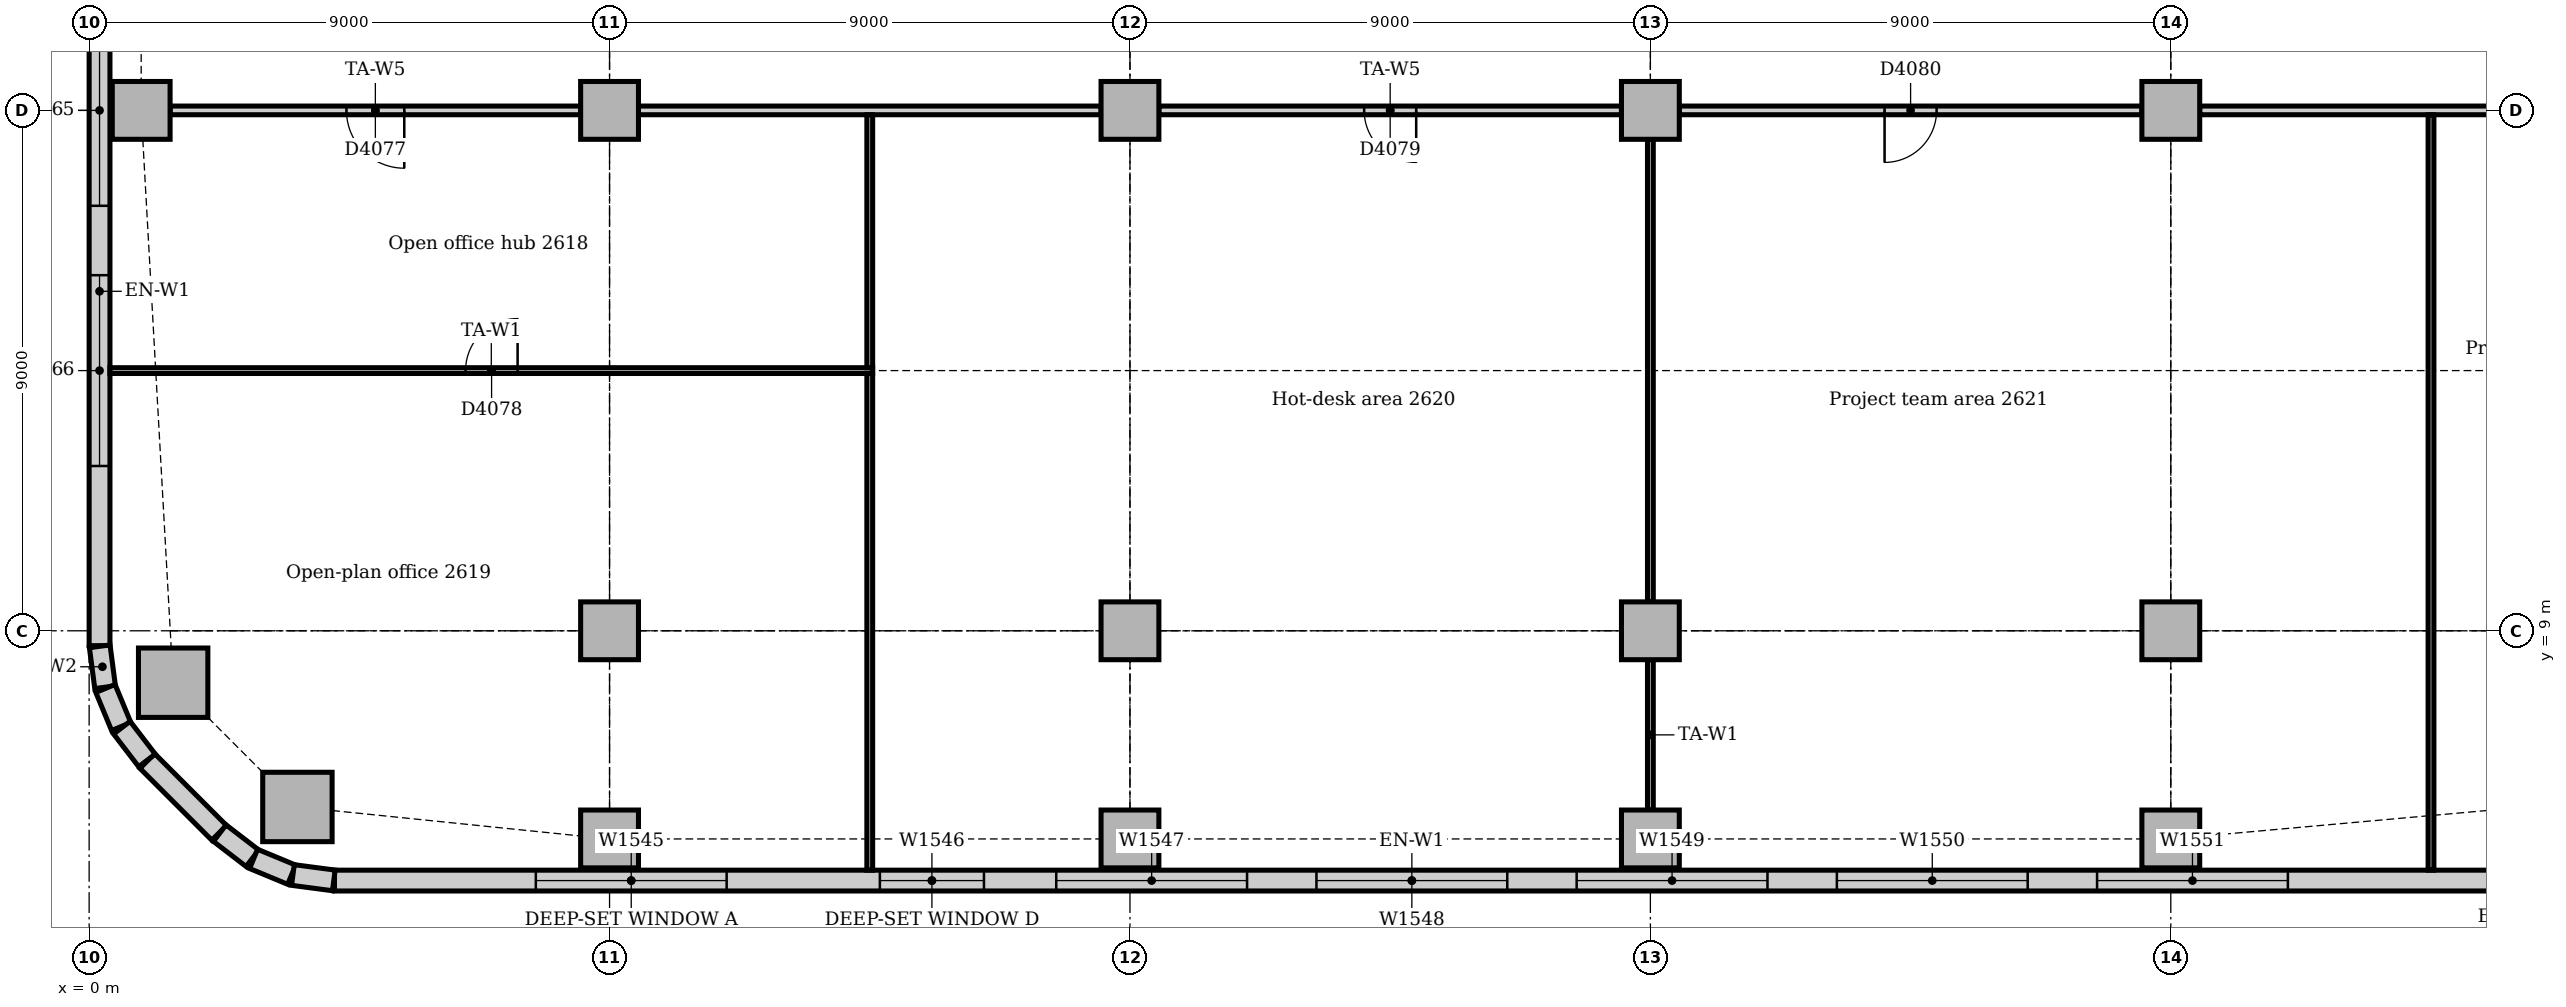
"""IFC4 building model, lengths in metres.
Left out: names, types, materials, properties, quantities, classifications, styles, units other than length and angle.
Written with IfcOpenShell. Run it as: python <this file> out.ifc"""

import sys

from ifc_helpers import new_model, si_unit, direction, frame, frame_2d, origin, origin_2d, place, context, subcontext, project, spatial, rectangle, extrude, element, fill, save


model = new_model("IFC4")
c1 = context("Model", 3, precision=1e-05, world=origin(), true_north=direction((0.0, 1.0)))
c2 = subcontext(c1, "Body", "Model", "MODEL_VIEW")
j1 = project(units=[si_unit("LENGTHUNIT", "METRE"), si_unit("PLANEANGLEUNIT", "RADIAN")], contexts=[c1])
p1 = place(None, origin())
s1 = spatial("IfcSite", under=j1, at=p1, CompositionType="ELEMENT")
p2 = place(p1, origin())
s2 = spatial("IfcBuilding", under=s1, at=p2, CompositionType="ELEMENT")
p3 = place(p2, frame((0.0, 0.0, 112.0)))
s3 = spatial("IfcBuildingStorey", under=s2, at=p3, CompositionType="ELEMENT", Elevation=112.0)
for number, where, z_axis, x_axis in (
    (1, (3.602, 5.953, 0.0), (0.0, 0.0, 1.0), (1.0, 0.0, 0.0)),
    (2, (1.453, 8.102, 0.0), (0.0, 0.0, 1.0), (1.0, 0.0, 0.0)),
):
    element("IfcColumn", number, at=place(p3, frame(where, z_axis=z_axis, x_axis=x_axis)), inside=s3, PredefinedType="COLUMN", context=c2, shape_type="SweptSolid", body=[
        extrude(rectangle(XDim=1.2, YDim=1.2, at=origin_2d()), origin(), (0.0, 0.0, 1.0), 3.85),
    ])
for number, where, z_axis, x_axis in (
    (3, (9.0, 5.4, 0.0), (0.0, 0.0, 1.0), (1.0, 0.0, 0.0)),
    (4, (18.0, 5.4, 0.0), (0.0, 0.0, 1.0), (1.0, 0.0, 0.0)),
    (5, (27.0, 5.4, 0.0), (0.0, 0.0, 1.0), (1.0, 0.0, 0.0)),
    (6, (36.0, 5.4, 0.0), (0.0, 0.0, 1.0), (1.0, 0.0, 0.0)),
    (7, (0.9, 18.0, 0.0), (0.0, 0.0, 1.0), (1.0, 0.0, 0.0)),
    (8, (9.0, 9.0, 0.0), (0.0, 0.0, 1.0), (1.0, 0.0, 0.0)),
    (9, (9.0, 18.0, 0.0), (0.0, 0.0, 1.0), (1.0, 0.0, 0.0)),
    (10, (18.0, 9.0, 0.0), (0.0, 0.0, 1.0), (1.0, 0.0, 0.0)),
    (11, (18.0, 18.0, 0.0), (0.0, 0.0, 1.0), (1.0, 0.0, 0.0)),
    (12, (27.0, 9.0, 0.0), (0.0, 0.0, 1.0), (1.0, 0.0, 0.0)),
    (13, (27.0, 18.0, 0.0), (0.0, 0.0, 1.0), (1.0, 0.0, 0.0)),
    (14, (36.0, 9.0, 0.0), (0.0, 0.0, 1.0), (1.0, 0.0, 0.0)),
    (15, (36.0, 18.0, 0.0), (0.0, 0.0, 1.0), (1.0, 0.0, 0.0)),
):
    element("IfcColumn", number, at=place(p3, frame(where, z_axis=z_axis, x_axis=x_axis)), inside=s3, PredefinedType="COLUMN", context=c2, shape_type="SweptSolid", body=[
        extrude(rectangle(XDim=1.0, YDim=1.0, at=origin_2d()), origin(), (0.0, 0.0, 1.0), 3.85),
    ])
p4 = place(p3, frame((4.243, 4.68, 0.0), z_axis=(0.0, 0.0, 1.0), x_axis=(1.0, 0.0, 0.0)))
e16 = element("IfcWall", 16, at=p4, inside=s3, PredefinedType="STANDARD", context=c2, shape_type="SweptSolid", body=[
    extrude(rectangle(XDim=37.265, YDim=0.36, at=frame_2d((18.632, 0.0))), origin(), (0.0, 0.0, 1.0), 3.85),
])
p5 = place(p4, frame((3.482, 0.0, 0.9)))
e17 = element("IfcOpeningElement", 17, at=p5, cuts=e16, PredefinedType="OPENING", context=c2, shape_type="SweptSolid", body=[
    extrude(rectangle(XDim=3.3, YDim=1.6, at=frame_2d((1.65, 0.8))), frame((0.0, 0.19, 0.0), z_axis=(0.0, -1.0, 0.0), x_axis=(1.0, 0.0, 0.0)), (0.0, 0.0, 1.0), 0.38),
])
p6 = place(p4, frame((9.432, 0.0, 0.9)))
e18 = element("IfcOpeningElement", 18, at=p6, cuts=e16, PredefinedType="OPENING", context=c2, shape_type="SweptSolid", body=[
    extrude(rectangle(XDim=1.8, YDim=1.6, at=frame_2d((0.9, 0.8))), frame((0.0, 0.19, 0.0), z_axis=(0.0, -1.0, 0.0), x_axis=(1.0, 0.0, 0.0)), (0.0, 0.0, 1.0), 0.38),
])
p7 = place(p4, frame((12.482, 0.0, 0.9)))
e19 = element("IfcOpeningElement", 19, at=p7, cuts=e16, PredefinedType="OPENING", context=c2, shape_type="SweptSolid", body=[
    extrude(rectangle(XDim=3.3, YDim=1.6, at=frame_2d((1.65, 0.8))), frame((0.0, 0.19, 0.0), z_axis=(0.0, -1.0, 0.0), x_axis=(1.0, 0.0, 0.0)), (0.0, 0.0, 1.0), 0.38),
])
p8 = place(p4, frame((16.982, 0.0, 0.9)))
e20 = element("IfcOpeningElement", 20, at=p8, cuts=e16, PredefinedType="OPENING", context=c2, shape_type="SweptSolid", body=[
    extrude(rectangle(XDim=3.3, YDim=1.6, at=frame_2d((1.65, 0.8))), frame((0.0, 0.19, 0.0), z_axis=(0.0, -1.0, 0.0), x_axis=(1.0, 0.0, 0.0)), (0.0, 0.0, 1.0), 0.38),
])
p9 = place(p4, frame((21.482, 0.0, 0.9)))
e21 = element("IfcOpeningElement", 21, at=p9, cuts=e16, PredefinedType="OPENING", context=c2, shape_type="SweptSolid", body=[
    extrude(rectangle(XDim=3.3, YDim=1.6, at=frame_2d((1.65, 0.8))), frame((0.0, 0.19, 0.0), z_axis=(0.0, -1.0, 0.0), x_axis=(1.0, 0.0, 0.0)), (0.0, 0.0, 1.0), 0.38),
])
p10 = place(p4, frame((25.982, 0.0, 0.9)))
e22 = element("IfcOpeningElement", 22, at=p10, cuts=e16, PredefinedType="OPENING", context=c2, shape_type="SweptSolid", body=[
    extrude(rectangle(XDim=3.3, YDim=1.6, at=frame_2d((1.65, 0.8))), frame((0.0, 0.19, 0.0), z_axis=(0.0, -1.0, 0.0), x_axis=(1.0, 0.0, 0.0)), (0.0, 0.0, 1.0), 0.38),
])
p11 = place(p4, frame((30.482, 0.0, 0.9)))
e23 = element("IfcOpeningElement", 23, at=p11, cuts=e16, PredefinedType="OPENING", context=c2, shape_type="SweptSolid", body=[
    extrude(rectangle(XDim=3.3, YDim=1.6, at=frame_2d((1.65, 0.8))), frame((0.0, 0.19, 0.0), z_axis=(0.0, -1.0, 0.0), x_axis=(1.0, 0.0, 0.0)), (0.0, 0.0, 1.0), 0.38),
])
p12 = place(p3, frame((0.18, 21.0, 0.0), z_axis=(0.0, 0.0, 1.0), x_axis=(0.0, -1.0, 0.0)))
e24 = element("IfcWall", 24, at=p12, inside=s3, PredefinedType="STANDARD", context=c2, shape_type="SweptSolid", body=[
    extrude(rectangle(XDim=12.257, YDim=0.36, at=frame_2d((6.129, 0.0))), origin(), (0.0, 0.0, 1.0), 3.85),
])
p13 = place(p12, frame((1.35, 0.0, 0.9)))
e25 = element("IfcOpeningElement", 25, at=p13, cuts=e24, PredefinedType="OPENING", context=c2, shape_type="SweptSolid", body=[
    extrude(rectangle(XDim=3.3, YDim=1.6, at=frame_2d((1.65, 0.8))), frame((0.0, 0.19, 0.0), z_axis=(0.0, -1.0, 0.0), x_axis=(1.0, 0.0, 0.0)), (0.0, 0.0, 1.0), 0.38),
])
p14 = place(p12, frame((5.85, 0.0, 0.9)))
e26 = element("IfcOpeningElement", 26, at=p14, cuts=e24, PredefinedType="OPENING", context=c2, shape_type="SweptSolid", body=[
    extrude(rectangle(XDim=3.3, YDim=1.6, at=frame_2d((1.65, 0.8))), frame((0.0, 0.19, 0.0), z_axis=(0.0, -1.0, 0.0), x_axis=(1.0, 0.0, 0.0)), (0.0, 0.0, 1.0), 0.38),
])
p15 = place(p3, frame((1.006, 6.749, 0.0), z_axis=(0.0, 0.0, 1.0), x_axis=(0.707106781187, -0.707106781187, 0.0)))
e27 = element("IfcWall", 27, at=p15, inside=s3, PredefinedType="STANDARD", context=c2, shape_type="SweptSolid", body=[
    extrude(rectangle(XDim=1.757, YDim=0.36, at=frame_2d((0.879, 0.0))), origin(), (0.0, 0.0, 1.0), 3.85),
])
for number, where, z_axis, x_axis in (
    (28, (0.183, 8.731, 0.0), (0.0, 0.0, 1.0), (0.131, -0.991, 0.0)),
    (29, (0.282, 8.003, 0.0), (0.0, 0.0, 1.0), (0.383, -0.924, 0.0)),
):
    element("IfcWall", number, at=place(p3, frame(where, z_axis=z_axis, x_axis=x_axis)), inside=s3, PredefinedType="STANDARD", context=c2, shape_type="SweptSolid", body=[
        extrude(rectangle(XDim=0.713, YDim=0.36, at=frame_2d((0.356, 0.0))), origin(), (0.0, 0.0, 1.0), 3.85),
    ])
for number, where, z_axis, x_axis in (
    (30, (0.566, 7.324, 0.0), (0.0, 0.0, 1.0), (0.609, -0.793, 0.0)),
    (31, (2.259, 5.5, 0.0), (0.0, 0.0, 1.0), (0.793, -0.609, 0.0)),
):
    element("IfcWall", number, at=place(p3, frame(where, z_axis=z_axis, x_axis=x_axis)), inside=s3, PredefinedType="STANDARD", context=c2, shape_type="SweptSolid", body=[
        extrude(rectangle(XDim=0.713, YDim=0.36, at=frame_2d((0.357, 0.0))), origin(), (0.0, 0.0, 1.0), 3.85),
    ])
for number, where, z_axis, x_axis in (
    (32, (2.844, 5.055, 0.0), (0.0, 0.0, 1.0), (0.924, -0.383, 0.0)),
    (33, (3.524, 4.776, 0.0), (0.0, 0.0, 1.0), (0.991, -0.131, 0.0)),
):
    element("IfcWall", number, at=place(p3, frame(where, z_axis=z_axis, x_axis=x_axis)), inside=s3, PredefinedType="STANDARD", context=c2, shape_type="SweptSolid", body=[
        extrude(rectangle(XDim=0.713, YDim=0.36, at=frame_2d((0.356, 0.0))), origin(), (0.0, 0.0, 1.0), 3.85),
    ])
p16 = place(p3, frame((36.5, 18.0, 0.0), z_axis=(0.0, 0.0, 1.0), x_axis=(1.0, 0.0, 0.0)))
e34 = element("IfcWall", 34, at=p16, inside=s3, PredefinedType="PARTITIONING", context=c2, shape_type="SweptSolid", body=[
    extrude(rectangle(XDim=8.0, YDim=0.15, at=frame_2d((4.0, 0.0))), origin(), (0.0, 0.0, 1.0), 3.158),
])
p17 = place(p3, frame((27.5, 18.0, 0.0), z_axis=(0.0, 0.0, 1.0), x_axis=(1.0, 0.0, 0.0)))
e35 = element("IfcWall", 35, at=p17, inside=s3, PredefinedType="PARTITIONING", context=c2, shape_type="SweptSolid", body=[
    extrude(rectangle(XDim=8.0, YDim=0.15, at=frame_2d((4.0, 0.0))), origin(), (0.0, 0.0, 1.0), 3.158),
])
p18 = place(p17, frame((3.55, 0.0, 0.0)))
e36 = element("IfcOpeningElement", 36, at=p18, cuts=e35, PredefinedType="OPENING", context=c2, shape_type="SweptSolid", body=[
    extrude(rectangle(XDim=0.9, YDim=2.1, at=frame_2d((0.45, 1.05))), frame((0.0, 0.085, 0.0), z_axis=(0.0, -1.0, 0.0), x_axis=(1.0, 0.0, 0.0)), (0.0, 0.0, 1.0), 0.17),
])
p19 = place(p3, frame((18.5, 18.0, 0.0), z_axis=(0.0, 0.0, 1.0), x_axis=(1.0, 0.0, 0.0)))
e37 = element("IfcWall", 37, at=p19, inside=s3, PredefinedType="PARTITIONING", context=c2, shape_type="SweptSolid", body=[
    extrude(rectangle(XDim=8.0, YDim=0.15, at=frame_2d((4.0, 0.0))), origin(), (0.0, 0.0, 1.0), 3.158),
])
p20 = place(p19, frame((3.55, 0.0, 0.0)))
e38 = element("IfcOpeningElement", 38, at=p20, cuts=e37, PredefinedType="OPENING", context=c2, shape_type="SweptSolid", body=[
    extrude(rectangle(XDim=0.9, YDim=2.1, at=frame_2d((0.45, 1.05))), frame((0.0, 0.085, 0.0), z_axis=(0.0, -1.0, 0.0), x_axis=(1.0, 0.0, 0.0)), (0.0, 0.0, 1.0), 0.17),
])
p21 = place(p3, frame((9.5, 18.0, 0.0), z_axis=(0.0, 0.0, 1.0), x_axis=(1.0, 0.0, 0.0)))
e39 = element("IfcWall", 39, at=p21, inside=s3, PredefinedType="PARTITIONING", context=c2, shape_type="SweptSolid", body=[
    extrude(rectangle(XDim=8.0, YDim=0.15, at=frame_2d((4.0, 0.0))), origin(), (0.0, 0.0, 1.0), 3.158),
])
p22 = place(p3, frame((1.4, 18.0, 0.0), z_axis=(0.0, 0.0, 1.0), x_axis=(1.0, 0.0, 0.0)))
e40 = element("IfcWall", 40, at=p22, inside=s3, PredefinedType="PARTITIONING", context=c2, shape_type="SweptSolid", body=[
    extrude(rectangle(XDim=7.1, YDim=0.15, at=frame_2d((3.55, 0.0))), origin(), (0.0, 0.0, 1.0), 3.158),
])
p23 = place(p22, frame((3.05, 0.0, 0.0)))
e41 = element("IfcOpeningElement", 41, at=p23, cuts=e40, PredefinedType="OPENING", context=c2, shape_type="SweptSolid", body=[
    extrude(rectangle(XDim=1.0, YDim=2.1, at=frame_2d((0.5, 1.05))), frame((0.0, 0.085, 0.0), z_axis=(0.0, -1.0, 0.0), x_axis=(1.0, 0.0, 0.0)), (0.0, 0.0, 1.0), 0.17),
])
p24 = place(p3, frame((0.36, 13.5, 0.0), z_axis=(0.0, 0.0, 1.0), x_axis=(1.0, 0.0, 0.0)))
e42 = element("IfcWall", 42, at=p24, inside=s3, PredefinedType="PARTITIONING", context=c2, shape_type="SweptSolid", body=[
    extrude(rectangle(XDim=13.19, YDim=0.1, at=frame_2d((6.595, 0.0))), origin(), (0.0, 0.0, 1.0), 3.354),
])
p25 = place(p24, frame((6.15, 0.0, 0.0)))
e43 = element("IfcOpeningElement", 43, at=p25, cuts=e42, PredefinedType="OPENING", context=c2, shape_type="SweptSolid", body=[
    extrude(rectangle(XDim=0.9, YDim=2.1, at=frame_2d((0.45, 1.05))), frame((0.0, 0.06, 0.0), z_axis=(0.0, -1.0, 0.0), x_axis=(1.0, 0.0, 0.0)), (0.0, 0.0, 1.0), 0.12),
])
p26 = place(p3, frame((13.5, 13.55, 0.0), z_axis=(0.0, 0.0, 1.0), x_axis=(0.0, 1.0, 0.0)))
e44 = element("IfcWall", 44, at=p26, inside=s3, PredefinedType="PARTITIONING", context=c2, shape_type="SweptSolid", body=[
    extrude(rectangle(XDim=4.375, YDim=0.1, at=frame_2d((2.188, 0.0))), origin(), (0.0, 0.0, 1.0), 3.85),
])
p27 = place(p3, frame((13.5, 4.86, 0.0), z_axis=(0.0, 0.0, 1.0), x_axis=(0.0, 1.0, 0.0)))
e45 = element("IfcWall", 45, at=p27, inside=s3, PredefinedType="PARTITIONING", context=c2, shape_type="SweptSolid", body=[
    extrude(rectangle(XDim=8.59, YDim=0.1, at=frame_2d((4.295, 0.0))), origin(), (0.0, 0.0, 1.0), 3.85),
])
p28 = place(p3, frame((27.0, 5.9, 0.0), z_axis=(0.0, 0.0, 1.0), x_axis=(0.0, 1.0, 0.0)))
e46 = element("IfcWall", 46, at=p28, inside=s3, PredefinedType="PARTITIONING", context=c2, shape_type="SweptSolid", body=[
    extrude(rectangle(XDim=2.6, YDim=0.1, at=frame_2d((1.3, 0.0))), origin(), (0.0, 0.0, 1.0), 3.652),
])
p29 = place(p3, frame((27.0, 9.5, 0.0), z_axis=(0.0, 0.0, 1.0), x_axis=(0.0, 1.0, 0.0)))
e47 = element("IfcWall", 47, at=p29, inside=s3, PredefinedType="PARTITIONING", context=c2, shape_type="SweptSolid", body=[
    extrude(rectangle(XDim=8.0, YDim=0.1, at=frame_2d((4.0, 0.0))), origin(), (0.0, 0.0, 1.0), 3.256),
])
p30 = place(p3, frame((40.5, 4.86, 0.0), z_axis=(0.0, 0.0, 1.0), x_axis=(0.0, 1.0, 0.0)))
e48 = element("IfcWall", 48, at=p30, inside=s3, PredefinedType="PARTITIONING", context=c2, shape_type="SweptSolid", body=[
    extrude(rectangle(XDim=13.065, YDim=0.1, at=frame_2d((6.532, 0.0))), origin(), (0.0, 0.0, 1.0), 3.85),
])
p31 = place(p5, origin())
e49 = element("IfcWindow", 49, at=p31, inside=s3, PartitioningType="SINGLE_PANEL", PredefinedType="WINDOW", context=c2, shape_type="SweptSolid", body=[
    extrude(rectangle(XDim=3.3, YDim=1.6, at=frame_2d((1.65, 0.8))), frame((0.0, 0.13, 0.0), z_axis=(0.0, -1.0, 0.0), x_axis=(1.0, 0.0, 0.0)), (0.0, 0.0, 1.0), 0.06),
])
fill(e17, e49)
p32 = place(p6, origin())
e50 = element("IfcWindow", 50, at=p32, inside=s3, PartitioningType="SINGLE_PANEL", PredefinedType="WINDOW", context=c2, shape_type="SweptSolid", body=[
    extrude(rectangle(XDim=1.8, YDim=1.6, at=frame_2d((0.9, 0.8))), frame((0.0, 0.13, 0.0), z_axis=(0.0, -1.0, 0.0), x_axis=(1.0, 0.0, 0.0)), (0.0, 0.0, 1.0), 0.06),
])
fill(e18, e50)
p33 = place(p7, origin())
e51 = element("IfcWindow", 51, at=p33, inside=s3, PartitioningType="SINGLE_PANEL", PredefinedType="WINDOW", context=c2, shape_type="SweptSolid", body=[
    extrude(rectangle(XDim=3.3, YDim=1.6, at=frame_2d((1.65, 0.8))), frame((0.0, 0.13, 0.0), z_axis=(0.0, -1.0, 0.0), x_axis=(1.0, 0.0, 0.0)), (0.0, 0.0, 1.0), 0.06),
])
fill(e19, e51)
p34 = place(p8, origin())
e52 = element("IfcWindow", 52, at=p34, inside=s3, PartitioningType="SINGLE_PANEL", PredefinedType="WINDOW", context=c2, shape_type="SweptSolid", body=[
    extrude(rectangle(XDim=3.3, YDim=1.6, at=frame_2d((1.65, 0.8))), frame((0.0, 0.13, 0.0), z_axis=(0.0, -1.0, 0.0), x_axis=(1.0, 0.0, 0.0)), (0.0, 0.0, 1.0), 0.06),
])
fill(e20, e52)
p35 = place(p9, origin())
e53 = element("IfcWindow", 53, at=p35, inside=s3, PartitioningType="SINGLE_PANEL", PredefinedType="WINDOW", context=c2, shape_type="SweptSolid", body=[
    extrude(rectangle(XDim=3.3, YDim=1.6, at=frame_2d((1.65, 0.8))), frame((0.0, 0.13, 0.0), z_axis=(0.0, -1.0, 0.0), x_axis=(1.0, 0.0, 0.0)), (0.0, 0.0, 1.0), 0.06),
])
fill(e21, e53)
p36 = place(p10, origin())
e54 = element("IfcWindow", 54, at=p36, inside=s3, PartitioningType="SINGLE_PANEL", PredefinedType="WINDOW", context=c2, shape_type="SweptSolid", body=[
    extrude(rectangle(XDim=3.3, YDim=1.6, at=frame_2d((1.65, 0.8))), frame((0.0, 0.13, 0.0), z_axis=(0.0, -1.0, 0.0), x_axis=(1.0, 0.0, 0.0)), (0.0, 0.0, 1.0), 0.06),
])
fill(e22, e54)
p37 = place(p11, origin())
e55 = element("IfcWindow", 55, at=p37, inside=s3, PartitioningType="SINGLE_PANEL", PredefinedType="WINDOW", context=c2, shape_type="SweptSolid", body=[
    extrude(rectangle(XDim=3.3, YDim=1.6, at=frame_2d((1.65, 0.8))), frame((0.0, 0.13, 0.0), z_axis=(0.0, -1.0, 0.0), x_axis=(1.0, 0.0, 0.0)), (0.0, 0.0, 1.0), 0.06),
])
fill(e23, e55)
p38 = place(p13, origin())
e56 = element("IfcWindow", 56, at=p38, inside=s3, PartitioningType="SINGLE_PANEL", PredefinedType="WINDOW", context=c2, shape_type="SweptSolid", body=[
    extrude(rectangle(XDim=3.3, YDim=1.6, at=frame_2d((1.65, 0.8))), frame((0.0, 0.13, 0.0), z_axis=(0.0, -1.0, 0.0), x_axis=(1.0, 0.0, 0.0)), (0.0, 0.0, 1.0), 0.06),
])
fill(e25, e56)
p39 = place(p14, origin())
e57 = element("IfcWindow", 57, at=p39, inside=s3, PartitioningType="SINGLE_PANEL", PredefinedType="WINDOW", context=c2, shape_type="SweptSolid", body=[
    extrude(rectangle(XDim=3.3, YDim=1.6, at=frame_2d((1.65, 0.8))), frame((0.0, 0.13, 0.0), z_axis=(0.0, -1.0, 0.0), x_axis=(1.0, 0.0, 0.0)), (0.0, 0.0, 1.0), 0.06),
])
fill(e26, e57)
p40 = place(p23, frame((1.0, 0.0, 0.0), z_axis=(0.0, 0.0, 1.0), x_axis=(-1.0, 0.0, 0.0)))
e58 = element("IfcDoor", 58, at=p40, inside=s3, OperationType="SINGLE_SWING_LEFT", PredefinedType="DOOR", context=c2, shape_type="SweptSolid", body=[
    extrude(rectangle(XDim=1.0, YDim=2.1, at=frame_2d((0.5, 1.05))), frame((0.0, 0.025, 0.0), z_axis=(0.0, -1.0, 0.0), x_axis=(1.0, 0.0, 0.0)), (0.0, 0.0, 1.0), 0.05),
])
fill(e41, e58)
p41 = place(p25, origin())
e59 = element("IfcDoor", 59, at=p41, inside=s3, OperationType="SINGLE_SWING_RIGHT", PredefinedType="DOOR", context=c2, shape_type="SweptSolid", body=[
    extrude(rectangle(XDim=0.9, YDim=2.1, at=frame_2d((0.45, 1.05))), frame((0.0, 0.025, 0.0), z_axis=(0.0, -1.0, 0.0), x_axis=(1.0, 0.0, 0.0)), (0.0, 0.0, 1.0), 0.05),
])
fill(e43, e59)
p42 = place(p20, frame((0.9, 0.0, 0.0), z_axis=(0.0, 0.0, 1.0), x_axis=(-1.0, 0.0, 0.0)))
e60 = element("IfcDoor", 60, at=p42, inside=s3, OperationType="SINGLE_SWING_LEFT", PredefinedType="DOOR", context=c2, shape_type="SweptSolid", body=[
    extrude(rectangle(XDim=0.9, YDim=2.1, at=frame_2d((0.45, 1.05))), frame((0.0, 0.025, 0.0), z_axis=(0.0, -1.0, 0.0), x_axis=(1.0, 0.0, 0.0)), (0.0, 0.0, 1.0), 0.05),
])
fill(e38, e60)
p43 = place(p18, frame((0.9, 0.0, 0.0), z_axis=(0.0, 0.0, 1.0), x_axis=(-1.0, 0.0, 0.0)))
e61 = element("IfcDoor", 61, at=p43, inside=s3, OperationType="SINGLE_SWING_RIGHT", PredefinedType="DOOR", context=c2, shape_type="SweptSolid", body=[
    extrude(rectangle(XDim=0.9, YDim=2.1, at=frame_2d((0.45, 1.05))), frame((0.0, 0.025, 0.0), z_axis=(0.0, -1.0, 0.0), x_axis=(1.0, 0.0, 0.0)), (0.0, 0.0, 1.0), 0.05),
])
fill(e36, e61)
save(model, sys.argv[1])
